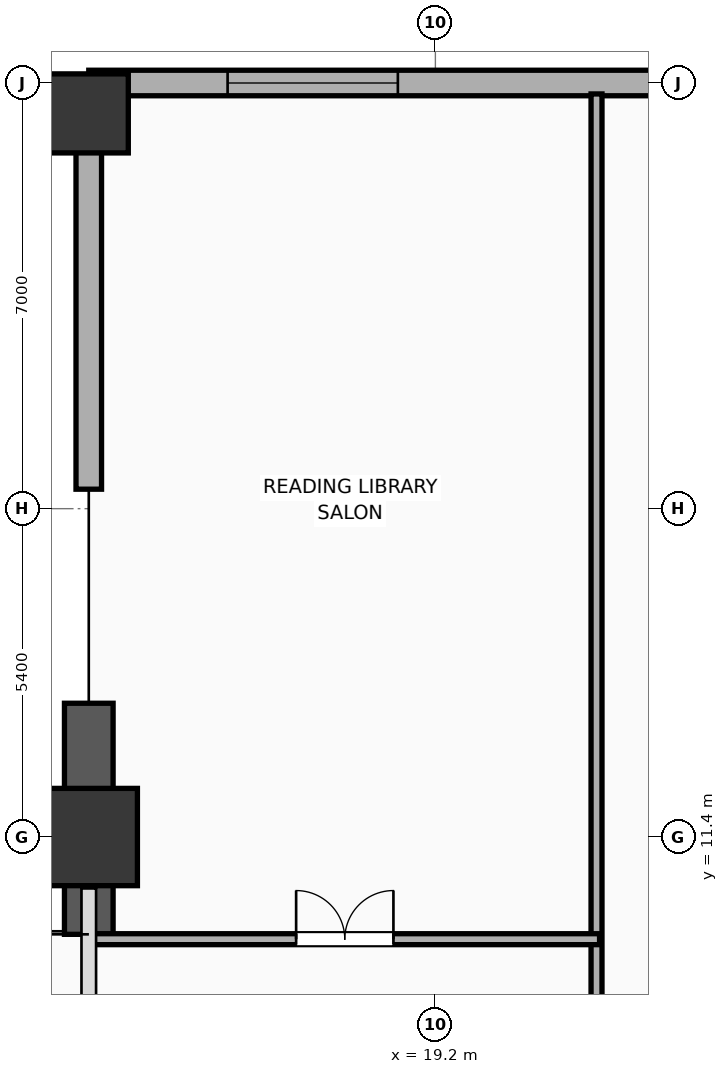
"""IFC4 building model, lengths in metres.
Left out: names, types, materials, properties, quantities, classifications, styles, units other than length and angle.
Written with IfcOpenShell. Run it as: python <this file> out.ifc"""

import sys

from ifc_helpers import new_model, si_unit, direction, frame, frame_2d, origin, origin_2d, place, context, subcontext, project, spatial, rectangle, extrude, element, fill, save


model = new_model("IFC4")
c1 = context("Model", 3, precision=1e-05, world=origin(), true_north=direction((0.0, 1.0)))
c2 = subcontext(c1, "Body", "Model", "MODEL_VIEW")
j1 = project(units=[si_unit("LENGTHUNIT", "METRE"), si_unit("PLANEANGLEUNIT", "RADIAN")], contexts=[c1])
p1 = place(None, origin())
s1 = spatial("IfcSite", under=j1, at=p1, CompositionType="ELEMENT")
p2 = place(p1, origin())
s2 = spatial("IfcBuilding", under=s1, at=p2, CompositionType="ELEMENT")
p3 = place(p2, frame((0.0, 0.0, 15.6)))
s3 = spatial("IfcBuildingStorey", under=s2, at=p3, CompositionType="ELEMENT", Elevation=15.6)
p4 = place(p3, frame((13.5, 11.4, 0.0), z_axis=(0.0, 0.0, 1.0), x_axis=(1.0, 0.0, 0.0)))
e1 = element("IfcColumn", 1, at=p4, inside=s3, PredefinedType="COLUMN", context=c2, shape_type="SweptSolid", body=[
    extrude(rectangle(XDim=1.6, YDim=1.6, at=origin_2d()), origin(), (0.0, 0.0, 1.0), 5.2),
])
p5 = place(p3, frame((13.5, 23.3, 0.0), z_axis=(0.0, 0.0, 1.0), x_axis=(1.0, 0.0, 0.0)))
e2 = element("IfcColumn", 2, at=p5, inside=s3, PredefinedType="COLUMN", context=c2, shape_type="SweptSolid", body=[
    extrude(rectangle(XDim=1.3, YDim=1.3, at=origin_2d()), origin(), (0.0, 0.0, 1.0), 5.2),
])
p6 = place(p3, frame((13.5, 9.8, 0.0), z_axis=(0.0, 0.0, 1.0), x_axis=(0.0, 1.0, 0.0)))
e3 = element("IfcWall", 3, at=p6, inside=s3, PredefinedType="SOLIDWALL", context=c2, shape_type="SweptSolid", body=[
    extrude(rectangle(XDim=3.8, YDim=0.8, at=frame_2d((1.9, 0.0))), origin(), (0.0, 0.0, 1.0), 4.8),
])
p7 = place(p3, frame((35.6, 23.8, 0.0), z_axis=(0.0, 0.0, 1.0), x_axis=(-1.0, 0.0, 0.0)))
e4 = element("IfcWall", 4, at=p7, inside=s3, PredefinedType="ELEMENTEDWALL", context=c2, shape_type="SweptSolid", body=[
    extrude(rectangle(XDim=22.1, YDim=0.42, at=frame_2d((11.05, 0.0))), origin(), (0.0, 0.0, 1.0), 4.8),
])
p8 = place(p7, frame((2.283, 0.0, 0.65)))
e5 = element("IfcOpeningElement", 5, at=p8, cuts=e4, PredefinedType="OPENING", context=c2, shape_type="SweptSolid", body=[
    extrude(rectangle(XDim=2.8, YDim=2.6, at=frame_2d((1.4, 1.3))), frame((0.0, 0.22, 0.0), z_axis=(0.0, -1.0, 0.0), x_axis=(1.0, 0.0, 0.0)), (0.0, 0.0, 1.0), 0.44),
])
p9 = place(p7, frame((17.017, 0.0, 0.65)))
e6 = element("IfcOpeningElement", 6, at=p9, cuts=e4, PredefinedType="OPENING", context=c2, shape_type="SweptSolid", body=[
    extrude(rectangle(XDim=2.8, YDim=2.6, at=frame_2d((1.4, 1.3))), frame((0.0, 0.22, 0.0), z_axis=(0.0, -1.0, 0.0), x_axis=(1.0, 0.0, 0.0)), (0.0, 0.0, 1.0), 0.44),
])
p10 = place(p3, frame((13.5, 17.12, 0.0), z_axis=(0.0, 0.0, 1.0), x_axis=(0.0, 1.0, 0.0)))
e7 = element("IfcWall", 7, at=p10, inside=s3, PredefinedType="ELEMENTEDWALL", context=c2, shape_type="SweptSolid", body=[
    extrude(rectangle(XDim=6.68, YDim=0.42, at=frame_2d((3.34, 0.0))), origin(), (0.0, 0.0, 1.0), 4.09),
])
p11 = place(p3, frame((21.85, -10.5, 0.0), z_axis=(0.0, 0.0, 1.0), x_axis=(0.0, 1.0, 0.0)))
e8 = element("IfcWall", 8, at=p11, inside=s3, PredefinedType="PARTITIONING", context=c2, shape_type="SweptSolid", body=[
    extrude(rectangle(XDim=34.12, YDim=0.18, at=frame_2d((17.06, 0.0))), origin(), (0.0, 0.0, 1.0), 4.8),
])
p12 = place(p11, frame((13.531, 0.0, 0.0)))
e9 = element("IfcOpeningElement", 9, at=p12, cuts=e8, PredefinedType="OPENING", context=c2, shape_type="SweptSolid", body=[
    extrude(rectangle(XDim=1.6, YDim=2.05, at=frame_2d((0.8, 1.025))), frame((0.0, 0.1, 0.0), z_axis=(0.0, -1.0, 0.0), x_axis=(1.0, 0.0, 0.0)), (0.0, 0.0, 1.0), 0.2),
])
p13 = place(p3, frame((13.52, 9.72, 0.0), z_axis=(0.0, 0.0, 1.0), x_axis=(1.0, 0.0, 0.0)))
e10 = element("IfcWall", 10, at=p13, inside=s3, PredefinedType="PARTITIONING", context=c2, shape_type="SweptSolid", body=[
    extrude(rectangle(XDim=8.38, YDim=0.18, at=frame_2d((4.19, 0.0))), origin(), (0.0, 0.0, 1.0), 4.8),
])
p14 = place(p13, frame((3.39, 0.0, 0.0)))
e11 = element("IfcOpeningElement", 11, at=p14, cuts=e10, PredefinedType="OPENING", context=c2, shape_type="SweptSolid", body=[
    extrude(rectangle(XDim=1.6, YDim=2.05, at=frame_2d((0.8, 1.025))), frame((0.0, 0.1, 0.0), z_axis=(0.0, -1.0, 0.0), x_axis=(1.0, 0.0, 0.0)), (0.0, 0.0, 1.0), 0.2),
])
p15 = place(p9, origin())
e12 = element("IfcWindow", 12, at=p15, inside=s3, PartitioningType="SINGLE_PANEL", PredefinedType="WINDOW", context=c2, shape_type="SweptSolid", body=[
    extrude(rectangle(XDim=2.8, YDim=2.6, at=frame_2d((1.4, 1.3))), frame((0.0, 0.03, 0.0), z_axis=(0.0, -1.0, 0.0), x_axis=(1.0, 0.0, 0.0)), (0.0, 0.0, 1.0), 0.06),
])
fill(e6, e12)
p16 = place(p14, origin())
e13 = element("IfcDoor", 13, at=p16, inside=s3, OperationType="DOUBLE_DOOR_SINGLE_SWING", PredefinedType="DOOR", context=c2, shape_type="SweptSolid", body=[
    extrude(rectangle(XDim=1.6, YDim=2.05, at=frame_2d((0.8, 1.025))), frame((0.0, 0.025, 0.0), z_axis=(0.0, -1.0, 0.0), x_axis=(1.0, 0.0, 0.0)), (0.0, 0.0, 1.0), 0.05),
])
fill(e11, e13)
save(model, sys.argv[1])
